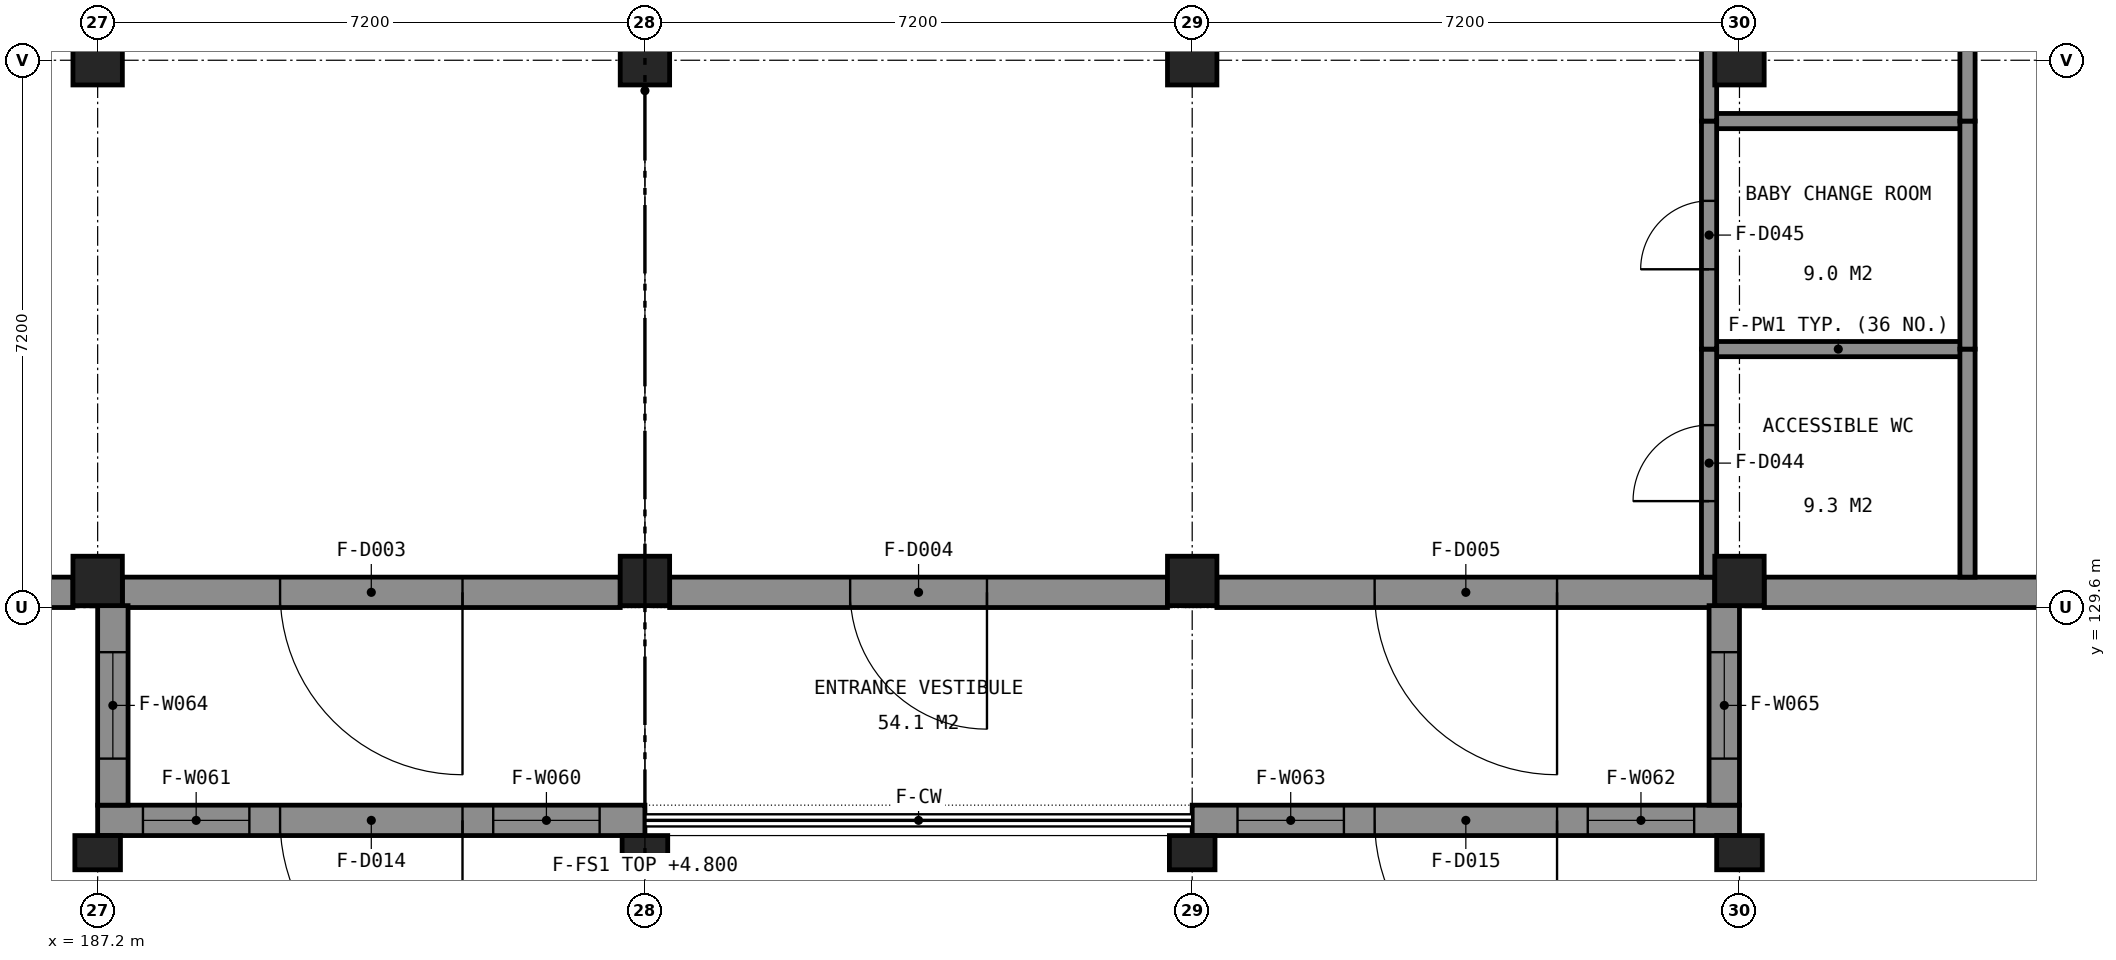
"""IFC4 building model, lengths in metres.
Left out: names, types, materials, properties, quantities, classifications, styles, units other than length and angle.
Written with IfcOpenShell. Run it as: python <this file> out.ifc"""

import sys

from ifc_helpers import new_model, si_unit, direction, frame, frame_2d, origin, origin_2d, place, context, subcontext, project, spatial, rectangle, extrude, element, fill, save


model = new_model("IFC4")
c1 = context("Model", 3, precision=1e-05, world=origin(), true_north=direction((0.0, 1.0)))
c2 = subcontext(c1, "Body", "Model", "MODEL_VIEW")
j1 = project(units=[si_unit("LENGTHUNIT", "METRE"), si_unit("PLANEANGLEUNIT", "RADIAN")], contexts=[c1])
p1 = place(None, origin())
s1 = spatial("IfcSite", under=j1, at=p1, CompositionType="ELEMENT")
p2 = place(p1, origin())
s2 = spatial("IfcBuilding", under=s1, at=p2, CompositionType="ELEMENT")
p3 = place(p2, frame((0.0, 0.0, 4.8)))
s3 = spatial("IfcBuildingStorey", under=s2, at=p3, CompositionType="ELEMENT", Elevation=4.8)
for number, where, z_axis, x_axis in (
    (1, (187.2, 129.95, 0.0), (0.0, 0.0, 1.0), (1.0, 0.0, 0.0)),
    (2, (194.4, 129.95, 0.0), (0.0, 0.0, 1.0), (1.0, 0.0, 0.0)),
    (3, (201.6, 129.95, 0.0), (0.0, 0.0, 1.0), (1.0, 0.0, 0.0)),
    (4, (208.8, 129.95, 0.0), (0.0, 0.0, 1.0), (1.0, 0.0, 0.0)),
    (5, (187.2, 136.8, 0.0), (0.0, 0.0, 1.0), (1.0, 0.0, 0.0)),
    (6, (194.4, 136.8, 0.0), (0.0, 0.0, 1.0), (1.0, 0.0, 0.0)),
    (7, (201.6, 136.8, 0.0), (0.0, 0.0, 1.0), (1.0, 0.0, 0.0)),
    (8, (208.8, 136.8, 0.0), (0.0, 0.0, 1.0), (1.0, 0.0, 0.0)),
):
    element("IfcColumn", number, at=place(p3, frame(where, z_axis=z_axis, x_axis=x_axis)), inside=s3, PredefinedType="COLUMN", context=c2, shape_type="SweptSolid", body=[
        extrude(rectangle(XDim=0.65, YDim=0.65, at=origin_2d()), origin(), (0.0, 0.0, 1.0), 4.8),
    ])
p4 = place(p3, frame((186.875, 129.8, 0.0), z_axis=(0.0, 0.0, 1.0), x_axis=(-1.0, 0.0, 0.0)))
e9 = element("IfcWall", 9, at=p4, inside=s3, PredefinedType="SOLIDWALL", context=c2, shape_type="SweptSolid", body=[
    extrude(rectangle(XDim=6.55, YDim=0.4, at=frame_2d((3.275, 0.0))), origin(), (0.0, 0.0, 1.0), 3.95),
])
p5 = place(p4, frame((1.275, 0.0, 1.0)))
e10 = element("IfcOpeningElement", 10, at=p5, cuts=e9, PredefinedType="OPENING", context=c2, shape_type="SweptSolid", body=[
    extrude(rectangle(XDim=1.4, YDim=1.8, at=frame_2d((0.7, 0.9))), frame((0.0, 0.21, 0.0), z_axis=(0.0, -1.0, 0.0), x_axis=(1.0, 0.0, 0.0)), (0.0, 0.0, 1.0), 0.42),
])
p6 = place(p4, frame((3.875, 0.0, 1.0)))
e11 = element("IfcOpeningElement", 11, at=p6, cuts=e9, PredefinedType="OPENING", context=c2, shape_type="SweptSolid", body=[
    extrude(rectangle(XDim=1.4, YDim=1.8, at=frame_2d((0.7, 0.9))), frame((0.0, 0.21, 0.0), z_axis=(0.0, -1.0, 0.0), x_axis=(1.0, 0.0, 0.0)), (0.0, 0.0, 1.0), 0.42),
])
p7 = place(p3, frame((194.075, 129.8, 0.0), z_axis=(0.0, 0.0, 1.0), x_axis=(-1.0, 0.0, 0.0)))
e12 = element("IfcWall", 12, at=p7, inside=s3, PredefinedType="SOLIDWALL", context=c2, shape_type="SweptSolid", body=[
    extrude(rectangle(XDim=6.55, YDim=0.4, at=frame_2d((3.275, 0.0))), origin(), (0.0, 0.0, 1.0), 3.95),
])
p8 = place(p7, frame((2.075, 0.0, 0.0)))
e13 = element("IfcOpeningElement", 13, at=p8, cuts=e12, PredefinedType="OPENING", context=c2, shape_type="SweptSolid", body=[
    extrude(rectangle(XDim=2.4, YDim=2.7, at=frame_2d((1.2, 1.35))), frame((0.0, 0.21, 0.0), z_axis=(0.0, -1.0, 0.0), x_axis=(1.0, 0.0, 0.0)), (0.0, 0.0, 1.0), 0.42),
])
p9 = place(p3, frame((201.275, 129.8, 0.0), z_axis=(0.0, 0.0, 1.0), x_axis=(-1.0, 0.0, 0.0)))
e14 = element("IfcWall", 14, at=p9, inside=s3, PredefinedType="SOLIDWALL", context=c2, shape_type="SweptSolid", body=[
    extrude(rectangle(XDim=6.55, YDim=0.4, at=frame_2d((3.275, 0.0))), origin(), (0.0, 0.0, 1.0), 3.95),
])
p10 = place(p9, frame((2.375, 0.0, 0.0)))
e15 = element("IfcOpeningElement", 15, at=p10, cuts=e14, PredefinedType="OPENING", context=c2, shape_type="SweptSolid", body=[
    extrude(rectangle(XDim=1.8, YDim=2.1, at=frame_2d((0.9, 1.05))), frame((0.0, 0.21, 0.0), z_axis=(0.0, -1.0, 0.0), x_axis=(1.0, 0.0, 0.0)), (0.0, 0.0, 1.0), 0.42),
])
p11 = place(p3, frame((208.475, 129.8, 0.0), z_axis=(0.0, 0.0, 1.0), x_axis=(-1.0, 0.0, 0.0)))
e16 = element("IfcWall", 16, at=p11, inside=s3, PredefinedType="SOLIDWALL", context=c2, shape_type="SweptSolid", body=[
    extrude(rectangle(XDim=6.55, YDim=0.4, at=frame_2d((3.275, 0.0))), origin(), (0.0, 0.0, 1.0), 3.95),
])
p12 = place(p11, frame((2.075, 0.0, 0.0)))
e17 = element("IfcOpeningElement", 17, at=p12, cuts=e16, PredefinedType="OPENING", context=c2, shape_type="SweptSolid", body=[
    extrude(rectangle(XDim=2.4, YDim=2.7, at=frame_2d((1.2, 1.35))), frame((0.0, 0.21, 0.0), z_axis=(0.0, -1.0, 0.0), x_axis=(1.0, 0.0, 0.0)), (0.0, 0.0, 1.0), 0.42),
])
p13 = place(p3, frame((215.675, 129.8, 0.0), z_axis=(0.0, 0.0, 1.0), x_axis=(-1.0, 0.0, 0.0)))
e18 = element("IfcWall", 18, at=p13, inside=s3, PredefinedType="SOLIDWALL", context=c2, shape_type="SweptSolid", body=[
    extrude(rectangle(XDim=6.55, YDim=0.4, at=frame_2d((3.275, 0.0))), origin(), (0.0, 0.0, 1.0), 3.95),
])
p14 = place(p13, frame((1.275, 0.0, 1.0)))
e19 = element("IfcOpeningElement", 19, at=p14, cuts=e18, PredefinedType="OPENING", context=c2, shape_type="SweptSolid", body=[
    extrude(rectangle(XDim=1.4, YDim=1.8, at=frame_2d((0.7, 0.9))), frame((0.0, 0.21, 0.0), z_axis=(0.0, -1.0, 0.0), x_axis=(1.0, 0.0, 0.0)), (0.0, 0.0, 1.0), 0.42),
])
for number, where, z_axis, x_axis in (
    (20, (186.9, 129.475, 0.0), (0.0, 0.0, 1.0), (-1.0, 0.0, 0.0)),
    (21, (215.7, 129.475, 0.0), (0.0, 0.0, 1.0), (-1.0, 0.0, 0.0)),
):
    element("IfcWall", number, at=place(p3, frame(where, z_axis=z_axis, x_axis=x_axis)), inside=s3, PredefinedType="SOLIDWALL", context=c2, shape_type="SweptSolid", body=[
        extrude(rectangle(XDim=6.6, YDim=0.25, at=frame_2d((3.3, 0.0))), origin(), (0.0, 0.0, 1.0), 0.6),
    ])
p15 = place(p3, frame((194.4, 126.8, 0.0), z_axis=(0.0, 0.0, 1.0), x_axis=(-1.0, 0.0, 0.0)))
e22 = element("IfcWall", 22, at=p15, inside=s3, PredefinedType="SOLIDWALL", context=c2, shape_type="SweptSolid", body=[
    extrude(rectangle(XDim=7.2, YDim=0.4, at=frame_2d((3.6, 0.0))), origin(), (0.0, 0.0, 1.0), 4.55),
])
p16 = place(p15, frame((2.4, 0.0, 0.0)))
e23 = element("IfcOpeningElement", 23, at=p16, cuts=e22, PredefinedType="OPENING", context=c2, shape_type="SweptSolid", body=[
    extrude(rectangle(XDim=2.4, YDim=2.7, at=frame_2d((1.2, 1.35))), frame((0.0, 0.21, 0.0), z_axis=(0.0, -1.0, 0.0), x_axis=(1.0, 0.0, 0.0)), (0.0, 0.0, 1.0), 0.42),
])
p17 = place(p15, frame((0.596, 0.0, 1.0)))
e24 = element("IfcOpeningElement", 24, at=p17, cuts=e22, PredefinedType="OPENING", context=c2, shape_type="SweptSolid", body=[
    extrude(rectangle(XDim=1.4, YDim=1.8, at=frame_2d((0.7, 0.9))), frame((0.0, 0.21, 0.0), z_axis=(0.0, -1.0, 0.0), x_axis=(1.0, 0.0, 0.0)), (0.0, 0.0, 1.0), 0.42),
])
p18 = place(p15, frame((5.204, 0.0, 1.0)))
e25 = element("IfcOpeningElement", 25, at=p18, cuts=e22, PredefinedType="OPENING", context=c2, shape_type="SweptSolid", body=[
    extrude(rectangle(XDim=1.4, YDim=1.8, at=frame_2d((0.7, 0.9))), frame((0.0, 0.21, 0.0), z_axis=(0.0, -1.0, 0.0), x_axis=(1.0, 0.0, 0.0)), (0.0, 0.0, 1.0), 0.42),
])
p19 = place(p3, frame((208.8, 126.8, 0.0), z_axis=(0.0, 0.0, 1.0), x_axis=(-1.0, 0.0, 0.0)))
e26 = element("IfcWall", 26, at=p19, inside=s3, PredefinedType="SOLIDWALL", context=c2, shape_type="SweptSolid", body=[
    extrude(rectangle(XDim=7.2, YDim=0.4, at=frame_2d((3.6, 0.0))), origin(), (0.0, 0.0, 1.0), 4.55),
])
p20 = place(p19, frame((2.4, 0.0, 0.0)))
e27 = element("IfcOpeningElement", 27, at=p20, cuts=e26, PredefinedType="OPENING", context=c2, shape_type="SweptSolid", body=[
    extrude(rectangle(XDim=2.4, YDim=2.7, at=frame_2d((1.2, 1.35))), frame((0.0, 0.21, 0.0), z_axis=(0.0, -1.0, 0.0), x_axis=(1.0, 0.0, 0.0)), (0.0, 0.0, 1.0), 0.42),
])
p21 = place(p19, frame((0.596, 0.0, 1.0)))
e28 = element("IfcOpeningElement", 28, at=p21, cuts=e26, PredefinedType="OPENING", context=c2, shape_type="SweptSolid", body=[
    extrude(rectangle(XDim=1.4, YDim=1.8, at=frame_2d((0.7, 0.9))), frame((0.0, 0.21, 0.0), z_axis=(0.0, -1.0, 0.0), x_axis=(1.0, 0.0, 0.0)), (0.0, 0.0, 1.0), 0.42),
])
p22 = place(p19, frame((5.204, 0.0, 1.0)))
e29 = element("IfcOpeningElement", 29, at=p22, cuts=e26, PredefinedType="OPENING", context=c2, shape_type="SweptSolid", body=[
    extrude(rectangle(XDim=1.4, YDim=1.8, at=frame_2d((0.7, 0.9))), frame((0.0, 0.21, 0.0), z_axis=(0.0, -1.0, 0.0), x_axis=(1.0, 0.0, 0.0)), (0.0, 0.0, 1.0), 0.42),
])
p23 = place(p3, frame((187.4, 127.0, 0.0), z_axis=(0.0, 0.0, 1.0), x_axis=(0.0, 1.0, 0.0)))
e30 = element("IfcWall", 30, at=p23, inside=s3, PredefinedType="SOLIDWALL", context=c2, shape_type="SweptSolid", body=[
    extrude(rectangle(XDim=2.625, YDim=0.4, at=frame_2d((1.312, 0.0))), origin(), (0.0, 0.0, 1.0), 4.55),
])
p24 = place(p23, frame((0.613, 0.0, 1.0)))
e31 = element("IfcOpeningElement", 31, at=p24, cuts=e30, PredefinedType="OPENING", context=c2, shape_type="SweptSolid", body=[
    extrude(rectangle(XDim=1.4, YDim=1.8, at=frame_2d((0.7, 0.9))), frame((0.0, 0.21, 0.0), z_axis=(0.0, -1.0, 0.0), x_axis=(1.0, 0.0, 0.0)), (0.0, 0.0, 1.0), 0.42),
])
p25 = place(p3, frame((208.6, 129.625, 0.0), z_axis=(0.0, 0.0, 1.0), x_axis=(0.0, -1.0, 0.0)))
e32 = element("IfcWall", 32, at=p25, inside=s3, PredefinedType="SOLIDWALL", context=c2, shape_type="SweptSolid", body=[
    extrude(rectangle(XDim=2.625, YDim=0.4, at=frame_2d((1.312, 0.0))), origin(), (0.0, 0.0, 1.0), 4.55),
])
p26 = place(p25, frame((0.613, 0.0, 1.0)))
e33 = element("IfcOpeningElement", 33, at=p26, cuts=e32, PredefinedType="OPENING", context=c2, shape_type="SweptSolid", body=[
    extrude(rectangle(XDim=1.4, YDim=1.8, at=frame_2d((0.7, 0.9))), frame((0.0, 0.21, 0.0), z_axis=(0.0, -1.0, 0.0), x_axis=(1.0, 0.0, 0.0)), (0.0, 0.0, 1.0), 0.42),
])
for number, where, z_axis, x_axis in (
    (34, (187.2, 126.375, 0.0), (0.0, 0.0, 1.0), (1.0, 0.0, 0.0)),
    (35, (194.4, 126.375, 0.0), (0.0, 0.0, 1.0), (1.0, 0.0, 0.0)),
    (36, (201.6, 126.375, 0.0), (0.0, 0.0, 1.0), (1.0, 0.0, 0.0)),
    (37, (208.8, 126.375, 0.0), (0.0, 0.0, 1.0), (1.0, 0.0, 0.0)),
):
    element("IfcColumn", number, at=place(p3, frame(where, z_axis=z_axis, x_axis=x_axis)), inside=s3, PredefinedType="PILASTER", context=c2, shape_type="SweptSolid", body=[
        extrude(rectangle(XDim=0.6, YDim=0.45, at=origin_2d()), origin(), (0.0, 0.0, 1.0), 4.8),
    ])
for number, where, z_axis, x_axis in (
    (38, (208.4, 133.0, 0.0), (0.0, 0.0, 1.0), (1.0, 0.0, 0.0)),
    (39, (208.4, 136.0, 0.0), (0.0, 0.0, 1.0), (1.0, 0.0, 0.0)),
):
    element("IfcWall", number, at=place(p3, frame(where, z_axis=z_axis, x_axis=x_axis)), inside=s3, PredefinedType="PARTITIONING", context=c2, shape_type="SweptSolid", body=[
        extrude(rectangle(XDim=3.4, YDim=0.2, at=frame_2d((1.7, 0.0))), origin(), (0.0, 0.0, 1.0), 3.95),
    ])
p27 = place(p3, frame((208.4, 130.0, 0.0), z_axis=(0.0, 0.0, 1.0), x_axis=(0.0, 1.0, 0.0)))
e40 = element("IfcWall", 40, at=p27, inside=s3, PredefinedType="PARTITIONING", context=c2, shape_type="SweptSolid", body=[
    extrude(rectangle(XDim=3.0, YDim=0.2, at=frame_2d((1.5, 0.0))), origin(), (0.0, 0.0, 1.0), 3.95),
])
p28 = place(p27, frame((1.0, 0.0, 0.0)))
e41 = element("IfcOpeningElement", 41, at=p28, cuts=e40, PredefinedType="OPENING", context=c2, shape_type="SweptSolid", body=[
    extrude(rectangle(XDim=1.0, YDim=2.1, at=frame_2d((0.5, 1.05))), frame((0.0, 0.11, 0.0), z_axis=(0.0, -1.0, 0.0), x_axis=(1.0, 0.0, 0.0)), (0.0, 0.0, 1.0), 0.22),
])
p29 = place(p3, frame((208.4, 133.0, 0.0), z_axis=(0.0, 0.0, 1.0), x_axis=(0.0, 1.0, 0.0)))
e42 = element("IfcWall", 42, at=p29, inside=s3, PredefinedType="PARTITIONING", context=c2, shape_type="SweptSolid", body=[
    extrude(rectangle(XDim=3.0, YDim=0.2, at=frame_2d((1.5, 0.0))), origin(), (0.0, 0.0, 1.0), 3.95),
])
p30 = place(p29, frame((1.05, 0.0, 0.0)))
e43 = element("IfcOpeningElement", 43, at=p30, cuts=e42, PredefinedType="OPENING", context=c2, shape_type="SweptSolid", body=[
    extrude(rectangle(XDim=0.9, YDim=2.1, at=frame_2d((0.45, 1.05))), frame((0.0, 0.11, 0.0), z_axis=(0.0, -1.0, 0.0), x_axis=(1.0, 0.0, 0.0)), (0.0, 0.0, 1.0), 0.22),
])
p31 = place(p3, frame((208.4, 136.0, 0.0), z_axis=(0.0, 0.0, 1.0), x_axis=(0.0, 1.0, 0.0)))
e44 = element("IfcWall", 44, at=p31, inside=s3, PredefinedType="PARTITIONING", context=c2, shape_type="SweptSolid", body=[
    extrude(rectangle(XDim=5.2, YDim=0.2, at=frame_2d((2.6, 0.0))), origin(), (0.0, 0.0, 1.0), 3.95),
])
for number, where, z_axis, x_axis in (
    (45, (211.8, 130.0, 0.0), (0.0, 0.0, 1.0), (0.0, 1.0, 0.0)),
    (46, (211.8, 133.0, 0.0), (0.0, 0.0, 1.0), (0.0, 1.0, 0.0)),
):
    element("IfcWall", number, at=place(p3, frame(where, z_axis=z_axis, x_axis=x_axis)), inside=s3, PredefinedType="PARTITIONING", context=c2, shape_type="SweptSolid", body=[
        extrude(rectangle(XDim=3.0, YDim=0.2, at=frame_2d((1.5, 0.0))), origin(), (0.0, 0.0, 1.0), 3.95),
    ])
p32 = place(p3, frame((211.8, 136.0, 0.0), z_axis=(0.0, 0.0, 1.0), x_axis=(0.0, 1.0, 0.0)))
e47 = element("IfcWall", 47, at=p32, inside=s3, PredefinedType="PARTITIONING", context=c2, shape_type="SweptSolid", body=[
    extrude(rectangle(XDim=5.2, YDim=0.2, at=frame_2d((2.6, 0.0))), origin(), (0.0, 0.0, 1.0), 3.95),
])
p33 = place(p8, origin())
e48 = element("IfcDoor", 48, at=p33, inside=s3, OperationType="NOTDEFINED", PredefinedType="DOOR", context=c2, shape_type="SweptSolid", body=[
    extrude(rectangle(XDim=2.4, YDim=2.7, at=frame_2d((1.2, 1.35))), frame((0.0, 0.025, 0.0), z_axis=(0.0, -1.0, 0.0), x_axis=(1.0, 0.0, 0.0)), (0.0, 0.0, 1.0), 0.05),
])
fill(e13, e48)
p34 = place(p10, origin())
e49 = element("IfcDoor", 49, at=p34, inside=s3, OperationType="NOTDEFINED", PredefinedType="DOOR", context=c2, shape_type="SweptSolid", body=[
    extrude(rectangle(XDim=1.8, YDim=2.1, at=frame_2d((0.9, 1.05))), frame((0.0, 0.025, 0.0), z_axis=(0.0, -1.0, 0.0), x_axis=(1.0, 0.0, 0.0)), (0.0, 0.0, 1.0), 0.05),
])
fill(e15, e49)
p35 = place(p12, origin())
e50 = element("IfcDoor", 50, at=p35, inside=s3, OperationType="NOTDEFINED", PredefinedType="DOOR", context=c2, shape_type="SweptSolid", body=[
    extrude(rectangle(XDim=2.4, YDim=2.7, at=frame_2d((1.2, 1.35))), frame((0.0, 0.025, 0.0), z_axis=(0.0, -1.0, 0.0), x_axis=(1.0, 0.0, 0.0)), (0.0, 0.0, 1.0), 0.05),
])
fill(e17, e50)
p36 = place(p16, origin())
e51 = element("IfcDoor", 51, at=p36, inside=s3, OperationType="NOTDEFINED", PredefinedType="DOOR", context=c2, shape_type="SweptSolid", body=[
    extrude(rectangle(XDim=2.4, YDim=2.7, at=frame_2d((1.2, 1.35))), frame((0.0, 0.025, 0.0), z_axis=(0.0, -1.0, 0.0), x_axis=(1.0, 0.0, 0.0)), (0.0, 0.0, 1.0), 0.05),
])
fill(e23, e51)
p37 = place(p17, origin())
e52 = element("IfcWindow", 52, at=p37, inside=s3, PartitioningType="SINGLE_PANEL", PredefinedType="WINDOW", context=c2, shape_type="SweptSolid", body=[
    extrude(rectangle(XDim=1.4, YDim=1.8, at=frame_2d((0.7, 0.9))), frame((0.0, -0.09, 0.0), z_axis=(0.0, -1.0, 0.0), x_axis=(1.0, 0.0, 0.0)), (0.0, 0.0, 1.0), 0.06),
])
fill(e24, e52)
p38 = place(p18, origin())
e53 = element("IfcWindow", 53, at=p38, inside=s3, PartitioningType="SINGLE_PANEL", PredefinedType="WINDOW", context=c2, shape_type="SweptSolid", body=[
    extrude(rectangle(XDim=1.4, YDim=1.8, at=frame_2d((0.7, 0.9))), frame((0.0, -0.09, 0.0), z_axis=(0.0, -1.0, 0.0), x_axis=(1.0, 0.0, 0.0)), (0.0, 0.0, 1.0), 0.06),
])
fill(e25, e53)
p39 = place(p20, origin())
e54 = element("IfcDoor", 54, at=p39, inside=s3, OperationType="NOTDEFINED", PredefinedType="DOOR", context=c2, shape_type="SweptSolid", body=[
    extrude(rectangle(XDim=2.4, YDim=2.7, at=frame_2d((1.2, 1.35))), frame((0.0, 0.025, 0.0), z_axis=(0.0, -1.0, 0.0), x_axis=(1.0, 0.0, 0.0)), (0.0, 0.0, 1.0), 0.05),
])
fill(e27, e54)
p40 = place(p21, origin())
e55 = element("IfcWindow", 55, at=p40, inside=s3, PartitioningType="SINGLE_PANEL", PredefinedType="WINDOW", context=c2, shape_type="SweptSolid", body=[
    extrude(rectangle(XDim=1.4, YDim=1.8, at=frame_2d((0.7, 0.9))), frame((0.0, -0.09, 0.0), z_axis=(0.0, -1.0, 0.0), x_axis=(1.0, 0.0, 0.0)), (0.0, 0.0, 1.0), 0.06),
])
fill(e28, e55)
p41 = place(p22, origin())
e56 = element("IfcWindow", 56, at=p41, inside=s3, PartitioningType="SINGLE_PANEL", PredefinedType="WINDOW", context=c2, shape_type="SweptSolid", body=[
    extrude(rectangle(XDim=1.4, YDim=1.8, at=frame_2d((0.7, 0.9))), frame((0.0, -0.09, 0.0), z_axis=(0.0, -1.0, 0.0), x_axis=(1.0, 0.0, 0.0)), (0.0, 0.0, 1.0), 0.06),
])
fill(e29, e56)
p42 = place(p24, origin())
e57 = element("IfcWindow", 57, at=p42, inside=s3, PartitioningType="SINGLE_PANEL", PredefinedType="WINDOW", context=c2, shape_type="SweptSolid", body=[
    extrude(rectangle(XDim=1.4, YDim=1.8, at=frame_2d((0.7, 0.9))), frame((0.0, -0.09, 0.0), z_axis=(0.0, -1.0, 0.0), x_axis=(1.0, 0.0, 0.0)), (0.0, 0.0, 1.0), 0.06),
])
fill(e31, e57)
p43 = place(p26, origin())
e58 = element("IfcWindow", 58, at=p43, inside=s3, PartitioningType="SINGLE_PANEL", PredefinedType="WINDOW", context=c2, shape_type="SweptSolid", body=[
    extrude(rectangle(XDim=1.4, YDim=1.8, at=frame_2d((0.7, 0.9))), frame((0.0, -0.09, 0.0), z_axis=(0.0, -1.0, 0.0), x_axis=(1.0, 0.0, 0.0)), (0.0, 0.0, 1.0), 0.06),
])
fill(e33, e58)
p44 = place(p28, origin())
e59 = element("IfcDoor", 59, at=p44, inside=s3, OperationType="NOTDEFINED", PredefinedType="DOOR", context=c2, shape_type="SweptSolid", body=[
    extrude(rectangle(XDim=1.0, YDim=2.1, at=frame_2d((0.5, 1.05))), frame((0.0, 0.025, 0.0), z_axis=(0.0, -1.0, 0.0), x_axis=(1.0, 0.0, 0.0)), (0.0, 0.0, 1.0), 0.05),
])
fill(e41, e59)
p45 = place(p30, origin())
e60 = element("IfcDoor", 60, at=p45, inside=s3, OperationType="NOTDEFINED", PredefinedType="DOOR", context=c2, shape_type="SweptSolid", body=[
    extrude(rectangle(XDim=0.9, YDim=2.1, at=frame_2d((0.45, 1.05))), frame((0.0, 0.025, 0.0), z_axis=(0.0, -1.0, 0.0), x_axis=(1.0, 0.0, 0.0)), (0.0, 0.0, 1.0), 0.05),
])
fill(e43, e60)
save(model, sys.argv[1])
